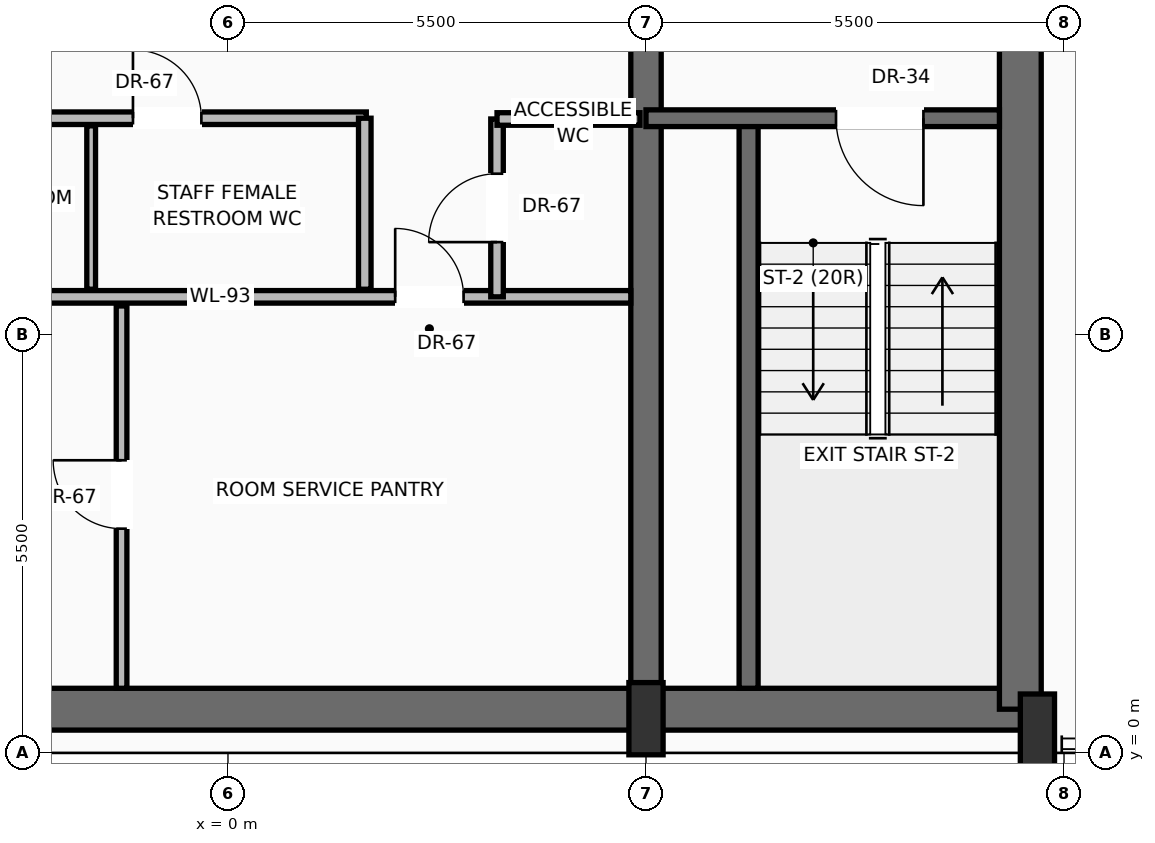
"""IFC4 building model, lengths in metres.
Left out: names, types, materials, properties, quantities, classifications, styles, units other than length and angle.
Written with IfcOpenShell. Run it as: python <this file> out.ifc"""

import sys

from ifc_helpers import new_model, si_unit, direction, frame, frame_2d, origin, origin_2d, place, context, subcontext, project, spatial, rectangle, extrude, source, transform, mapped, element, fill, save


model = new_model("IFC4")
c1 = context("Model", 3, precision=1e-05, world=origin(), true_north=direction((0.0, 1.0)))
c2 = subcontext(c1, "Body", "Model", "MODEL_VIEW")
j1 = project(units=[si_unit("LENGTHUNIT", "METRE"), si_unit("PLANEANGLEUNIT", "RADIAN")], contexts=[c1])
p1 = place(None, origin())
s1 = spatial("IfcSite", under=j1, at=p1, CompositionType="ELEMENT")
p2 = place(p1, origin())
s2 = spatial("IfcBuilding", under=s1, at=p2, CompositionType="ELEMENT")
p3 = place(p2, frame((0.0, 0.0, 226.9)))
s3 = spatial("IfcBuildingStorey", under=s2, at=p3, CompositionType="ELEMENT", Elevation=226.9)
p4 = place(p3, frame((-10.65, 0.575, 0.0), z_axis=(0.0, 0.0, 1.0), x_axis=(1.0, 0.0, 0.0)))
e1 = element("IfcWall", 1, at=p4, inside=s3, PredefinedType="SHEAR", context=c2, shape_type="SweptSolid", body=[
    extrude(rectangle(XDim=21.3, YDim=0.55, at=frame_2d((10.65, 0.0))), origin(), (0.0, 0.0, 1.0), 3.24),
])
p5 = place(p3, frame((10.425, 0.575, 0.0), z_axis=(0.0, 0.0, 1.0), x_axis=(0.0, 1.0, 0.0)))
e2 = element("IfcWall", 2, at=p5, inside=s3, PredefinedType="SHEAR", context=c2, shape_type="SweptSolid", body=[
    extrude(rectangle(XDim=15.45, YDim=0.55, at=frame_2d((7.725, 0.0))), origin(), (0.0, 0.0, 1.0), 3.24),
])
p6 = place(p3, frame((5.5, 0.575, 0.0), z_axis=(0.0, 0.0, 1.0), x_axis=(0.0, 1.0, 0.0)))
e3 = element("IfcWall", 3, at=p6, inside=s3, PredefinedType="SHEAR", context=c2, shape_type="SweptSolid", body=[
    extrude(rectangle(XDim=15.45, YDim=0.4, at=frame_2d((7.725, 0.0))), origin(), (0.0, 0.0, 1.0), 3.24),
])
p7 = place(p6, frame((8.925, 0.0, 0.0)))
e4 = element("IfcOpeningElement", 4, at=p7, cuts=e3, PredefinedType="OPENING", context=c2, shape_type="SweptSolid", body=[
    extrude(rectangle(XDim=1.1, YDim=2.2, at=frame_2d((0.55, 1.1))), frame((0.0, 0.21, 0.0), z_axis=(0.0, -1.0, 0.0), x_axis=(1.0, 0.0, 0.0)), (0.0, 0.0, 1.0), 0.42),
])
m1 = source(origin(), c2, "Body", "SweptSolid", [
    extrude(rectangle(XDim=0.45, YDim=0.95, at=origin_2d()), origin(), (0.0, 0.0, 1.0), 3.45),
])
for number, where, z_axis, x_axis in (
    (5, (5.5, 0.45, 0.0), (0.0, 0.0, 1.0), (1.0, 0.0, 0.0)),
    (6, (10.65, 0.3, 0.0), (0.0, 0.0, 1.0), (1.0, 0.0, 0.0)),
):
    element("IfcColumn", number, at=place(p3, frame(where, z_axis=z_axis, x_axis=x_axis)), inside=s3, PredefinedType="PILASTER", context=c2, shape_type="MappedRepresentation", body=[
        mapped(m1, transform((0.0, 0.0, 0.0), scale=1.0)),
    ])
p8 = place(p3, frame((6.85, 0.85, 0.0), z_axis=(0.0, 0.0, 1.0), x_axis=(0.0, 1.0, 0.0)))
e7 = element("IfcWall", 7, at=p8, inside=s3, PredefinedType="SOLIDWALL", context=c2, shape_type="SweptSolid", body=[
    extrude(rectangle(XDim=7.5, YDim=0.25, at=frame_2d((3.75, 0.0))), origin(), (0.0, 0.0, 1.0), 3.24),
])
p9 = place(p3, frame((10.15, 8.35, 0.0), z_axis=(0.0, 0.0, 1.0), x_axis=(-1.0, 0.0, 0.0)))
e8 = element("IfcWall", 8, at=p9, inside=s3, PredefinedType="SOLIDWALL", context=c2, shape_type="SweptSolid", body=[
    extrude(rectangle(XDim=4.65, YDim=0.22, at=frame_2d((2.325, 0.0))), origin(), (0.0, 0.0, 1.0), 3.24),
])
p10 = place(p9, frame((1.0, 0.0, 0.0)))
e9 = element("IfcOpeningElement", 9, at=p10, cuts=e8, PredefinedType="OPENING", context=c2, shape_type="SweptSolid", body=[
    extrude(rectangle(XDim=1.15, YDim=2.2, at=frame_2d((0.575, 1.1))), frame((0.0, 0.12, 0.0), z_axis=(0.0, -1.0, 0.0), x_axis=(1.0, 0.0, 0.0)), (0.0, 0.0, 1.0), 0.24),
])
p11 = place(p3, frame((-5.5, 6.0, 0.0), z_axis=(0.0, 0.0, 1.0), x_axis=(1.0, 0.0, 0.0)))
e10 = element("IfcWall", 10, at=p11, inside=s3, PredefinedType="PARTITIONING", context=c2, shape_type="SweptSolid", body=[
    extrude(rectangle(XDim=10.8, YDim=0.165, at=frame_2d((5.4, 0.0))), origin(), (0.0, 0.0, 1.0), 3.232),
])
p12 = place(p11, frame((7.7, 0.0, 0.0)))
e11 = element("IfcOpeningElement", 11, at=p12, cuts=e10, PredefinedType="OPENING", context=c2, shape_type="SweptSolid", body=[
    extrude(rectangle(XDim=0.9, YDim=2.1, at=frame_2d((0.45, 1.05))), frame((0.0, 0.093, 0.0), z_axis=(0.0, -1.0, 0.0), x_axis=(1.0, 0.0, 0.0)), (0.0, 0.0, 1.0), 0.185),
])
p13 = place(p3, frame((-1.4, 0.85, 0.0), z_axis=(0.0, 0.0, 1.0), x_axis=(0.0, 1.0, 0.0)))
e12 = element("IfcWall", 12, at=p13, inside=s3, PredefinedType="PARTITIONING", context=c2, shape_type="SweptSolid", body=[
    extrude(rectangle(XDim=5.03, YDim=0.14, at=frame_2d((2.515, 0.0))), origin(), (0.0, 0.0, 1.0), 3.232),
])
p14 = place(p13, frame((2.1, 0.0, 0.0)))
e13 = element("IfcOpeningElement", 13, at=p14, cuts=e12, PredefinedType="OPENING", context=c2, shape_type="SweptSolid", body=[
    extrude(rectangle(XDim=0.9, YDim=2.1, at=frame_2d((0.45, 1.05))), frame((0.0, 0.08, 0.0), z_axis=(0.0, -1.0, 0.0), x_axis=(1.0, 0.0, 0.0)), (0.0, 0.0, 1.0), 0.16),
])
p15 = place(p3, frame((3.54, 6.0, 0.0), z_axis=(0.0, 0.0, 1.0), x_axis=(0.0, 1.0, 0.0)))
e14 = element("IfcWall", 14, at=p15, inside=s3, PredefinedType="PARTITIONING", context=c2, shape_type="SweptSolid", body=[
    extrude(rectangle(XDim=2.34, YDim=0.165, at=frame_2d((1.17, 0.0))), origin(), (0.0, 0.0, 1.0), 3.232),
])
p16 = place(p15, frame((0.72, 0.0, 0.0)))
e15 = element("IfcOpeningElement", 15, at=p16, cuts=e14, PredefinedType="OPENING", context=c2, shape_type="SweptSolid", body=[
    extrude(rectangle(XDim=0.9, YDim=2.1, at=frame_2d((0.45, 1.05))), frame((0.0, 0.093, 0.0), z_axis=(0.0, -1.0, 0.0), x_axis=(1.0, 0.0, 0.0)), (0.0, 0.0, 1.0), 0.185),
])
p17 = place(p3, frame((3.54, 8.34, 0.0), z_axis=(0.0, 0.0, 1.0), x_axis=(1.0, 0.0, 0.0)))
e16 = element("IfcWall", 16, at=p17, inside=s3, PredefinedType="PARTITIONING", context=c2, shape_type="SweptSolid", body=[
    extrude(rectangle(XDim=1.88, YDim=0.165, at=frame_2d((0.94, 0.0))), origin(), (0.0, 0.0, 1.0), 3.232),
])
p18 = place(p3, frame((-5.3, 8.35, 0.0), z_axis=(0.0, 0.0, 1.0), x_axis=(1.0, 0.0, 0.0)))
e17 = element("IfcWall", 17, at=p18, inside=s3, PredefinedType="PARTITIONING", context=c2, shape_type="SweptSolid", body=[
    extrude(rectangle(XDim=7.12, YDim=0.165, at=frame_2d((3.56, 0.0))), origin(), (0.0, 0.0, 1.0), 3.232),
])
p19 = place(p18, frame((0.85, 0.0, 0.0)))
e18 = element("IfcOpeningElement", 18, at=p19, cuts=e17, PredefinedType="OPENING", context=c2, shape_type="SweptSolid", body=[
    extrude(rectangle(XDim=0.9, YDim=2.1, at=frame_2d((0.45, 1.05))), frame((0.0, 0.093, 0.0), z_axis=(0.0, -1.0, 0.0), x_axis=(1.0, 0.0, 0.0)), (0.0, 0.0, 1.0), 0.185),
])
p20 = place(p18, frame((4.05, 0.0, 0.0)))
e19 = element("IfcOpeningElement", 19, at=p20, cuts=e17, PredefinedType="OPENING", context=c2, shape_type="SweptSolid", body=[
    extrude(rectangle(XDim=0.9, YDim=2.1, at=frame_2d((0.45, 1.05))), frame((0.0, 0.093, 0.0), z_axis=(0.0, -1.0, 0.0), x_axis=(1.0, 0.0, 0.0)), (0.0, 0.0, 1.0), 0.185),
])
p21 = place(p3, frame((1.8, 6.1, 0.0), z_axis=(0.0, 0.0, 1.0), x_axis=(0.0, 1.0, 0.0)))
e20 = element("IfcWall", 20, at=p21, inside=s3, PredefinedType="PARTITIONING", context=c2, shape_type="SweptSolid", body=[
    extrude(rectangle(XDim=2.25, YDim=0.165, at=frame_2d((1.125, 0.0))), origin(), (0.0, 0.0, 1.0), 3.232),
])
p22 = place(p3, frame((-1.8, 6.1, 0.0), z_axis=(0.0, 0.0, 1.0), x_axis=(0.0, 1.0, 0.0)))
e21 = element("IfcWall", 21, at=p22, inside=s3, PredefinedType="PARTITIONING", context=c2, shape_type="SweptSolid", body=[
    extrude(rectangle(XDim=2.15, YDim=0.115, at=frame_2d((1.075, 0.0))), origin(), (0.0, 0.0, 1.0), 3.232),
])
m2 = source(origin(), c2, "Body", "SweptSolid", [
    extrude(rectangle(XDim=1.15, YDim=2.2, at=frame_2d((0.575, 1.1))), frame((0.0, 0.025, 0.0), z_axis=(0.0, -1.0, 0.0), x_axis=(1.0, 0.0, 0.0)), (0.0, 0.0, 1.0), 0.05),
])
p23 = place(p10, origin())
e22 = element("IfcDoor", 22, at=p23, inside=s3, OperationType="SINGLE_SWING_LEFT", PredefinedType="DOOR", context=c2, shape_type="MappedRepresentation", body=[
    mapped(m2, transform((0.0, 0.0, 0.0), scale=1.0)),
])
fill(e9, e22)
m3 = source(origin(), c2, "Body", "SweptSolid", [
    extrude(rectangle(XDim=0.9, YDim=2.1, at=frame_2d((0.45, 1.05))), frame((0.0, 0.025, 0.0), z_axis=(0.0, -1.0, 0.0), x_axis=(1.0, 0.0, 0.0)), (0.0, 0.0, 1.0), 0.05),
])
p24 = place(p12, origin())
e23 = element("IfcDoor", 23, at=p24, inside=s3, OperationType="SINGLE_SWING_LEFT", PredefinedType="DOOR", context=c2, shape_type="MappedRepresentation", body=[
    mapped(m3, transform((0.0, 0.0, 0.0), scale=1.0)),
])
fill(e11, e23)
p25 = place(p14, origin())
e24 = element("IfcDoor", 24, at=p25, inside=s3, OperationType="SINGLE_SWING_RIGHT", PredefinedType="DOOR", context=c2, shape_type="MappedRepresentation", body=[
    mapped(m3, transform((0.0, 0.0, 0.0), scale=1.0)),
])
fill(e13, e24)
p26 = place(p16, origin())
e25 = element("IfcDoor", 25, at=p26, inside=s3, OperationType="SINGLE_SWING_LEFT", PredefinedType="DOOR", context=c2, shape_type="MappedRepresentation", body=[
    mapped(m3, transform((0.0, 0.0, 0.0), scale=1.0)),
])
fill(e15, e25)
p27 = place(p20, origin())
e26 = element("IfcDoor", 26, at=p27, inside=s3, OperationType="SINGLE_SWING_LEFT", PredefinedType="DOOR", context=c2, shape_type="MappedRepresentation", body=[
    mapped(m3, transform((0.0, 0.0, 0.0), scale=1.0)),
])
fill(e19, e26)
save(model, sys.argv[1])
